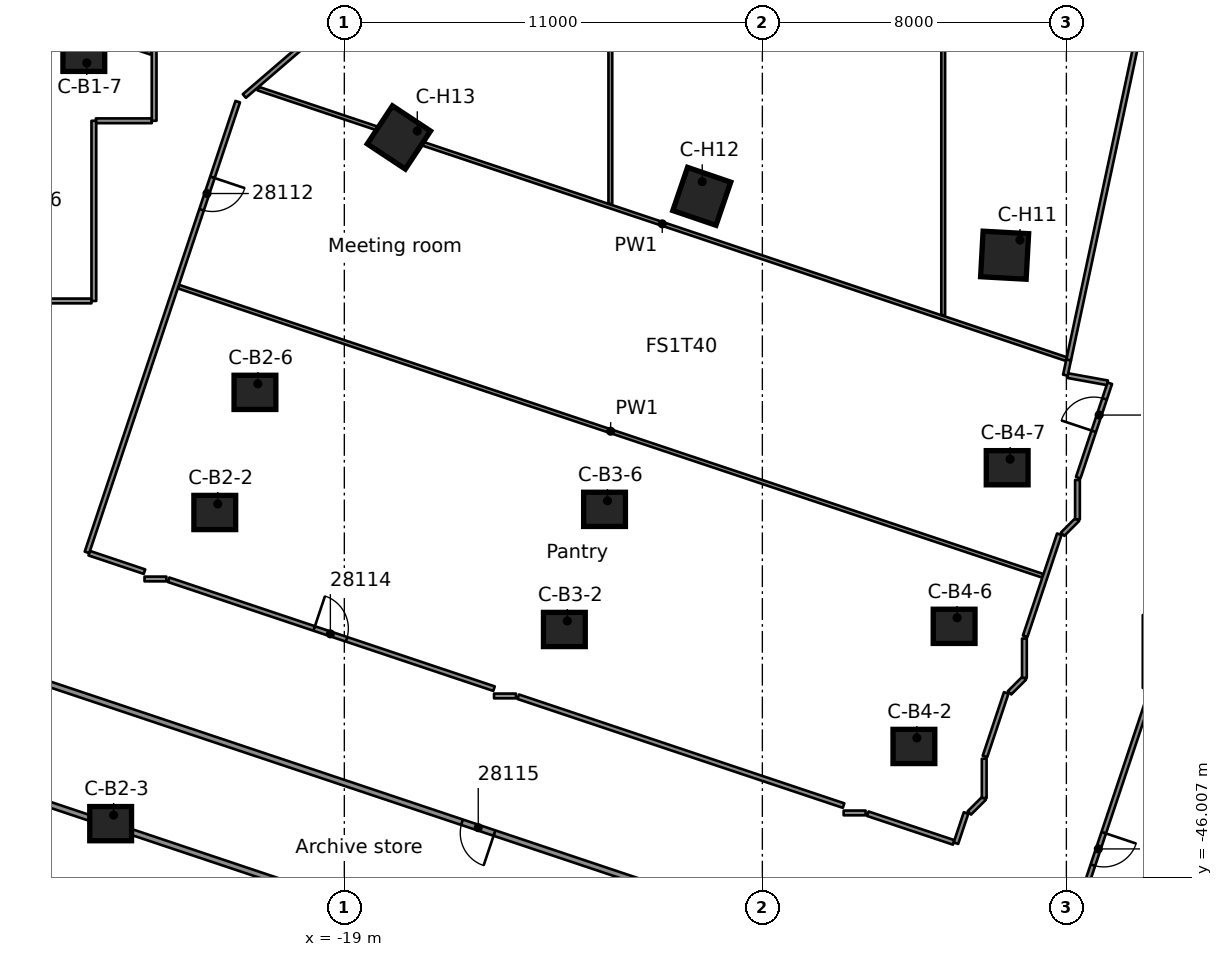
"""IFC4 building model, lengths in metres.
Left out: names, types, materials, properties, quantities, classifications, styles, units other than length and angle.
Written with IfcOpenShell. Run it as: python <this file> out.ifc"""

import sys

from ifc_helpers import new_model, si_unit, direction, frame, frame_2d, origin, origin_2d, place, context, subcontext, project, spatial, rectangle, extrude, element, fill, save


model = new_model("IFC4")
c1 = context("Model", 3, precision=1e-05, world=origin(), true_north=direction((0.0, 1.0)))
c2 = subcontext(c1, "Body", "Model", "MODEL_VIEW")
j1 = project(units=[si_unit("LENGTHUNIT", "METRE"), si_unit("PLANEANGLEUNIT", "RADIAN")], contexts=[c1])
p1 = place(None, origin())
s1 = spatial("IfcSite", under=j1, at=p1, CompositionType="ELEMENT")
p2 = place(p1, origin())
s2 = spatial("IfcBuilding", under=s1, at=p2, CompositionType="ELEMENT")
p3 = place(p2, frame((0.0, 0.0, 145.6)))
s3 = spatial("IfcBuildingStorey", under=s2, at=p3, CompositionType="ELEMENT", Elevation=145.6)
for number, where, z_axis, x_axis in (
    (1, (-25.855, -24.348, 0.0), (0.0, 0.0, 1.0), (1.0, 0.0, 0.0)),
    (2, (-22.409, -36.404, 0.0), (0.0, 0.0, 1.0), (1.0, 0.0, 0.0)),
    (3, (-25.149, -44.591, 0.0), (0.0, 0.0, 1.0), (1.0, 0.0, 0.0)),
    (4, (-21.352, -33.243, 0.0), (0.0, 0.0, 1.0), (1.0, 0.0, 0.0)),
    (5, (-13.21, -39.482, 0.0), (0.0, 0.0, 1.0), (1.0, 0.0, 0.0)),
    (6, (-12.153, -36.321, 0.0), (0.0, 0.0, 1.0), (1.0, 0.0, 0.0)),
    (7, (-4.012, -42.56, 0.0), (0.0, 0.0, 1.0), (1.0, 0.0, 0.0)),
    (8, (-2.954, -39.399, 0.0), (0.0, 0.0, 1.0), (1.0, 0.0, 0.0)),
    (9, (-1.558, -35.226, 0.0), (0.0, 0.0, 1.0), (1.0, 0.0, 0.0)),
):
    element("IfcColumn", number, at=place(p3, frame(where, z_axis=z_axis, x_axis=x_axis)), inside=s3, PredefinedType="COLUMN", context=c2, shape_type="SweptSolid", body=[
        extrude(rectangle(XDim=1.1, YDim=0.9, at=origin_2d()), origin(), (0.0, 0.0, 1.0), 3.5),
    ])
for number, where, z_axis, x_axis in (
    (10, (-1.625, -29.634, 0.0), (0.0, 0.0, 1.0), (-0.055, -0.998, 0.0)),
    (11, (-9.594, -28.085, 0.0), (0.0, 0.0, 1.0), (-0.323, -0.946, 0.0)),
    (12, (-17.564, -26.536, 0.0), (0.0, 0.0, 1.0), (-0.552, -0.834, 0.0)),
):
    element("IfcColumn", number, at=place(p3, frame(where, z_axis=z_axis, x_axis=x_axis)), inside=s3, PredefinedType="COLUMN", context=c2, shape_type="SweptSolid", body=[
        extrude(rectangle(XDim=1.2, YDim=1.2, at=origin_2d()), origin(), (0.0, 0.0, 1.0), 3.5),
    ])
p4 = place(p3, frame((-27.797, -43.741, 0.0), z_axis=(0.0, 0.0, 1.0), x_axis=(0.948342550157, -0.31724817976, 0.0)))
e13 = element("IfcWall", 13, at=p4, inside=s3, PredefinedType="PARTITIONING", context=c2, shape_type="SweptSolid", body=[
    extrude(rectangle(XDim=24.041, YDim=0.15, at=frame_2d((12.021, 0.0))), origin(), (0.0, 0.0, 1.0), 3.08),
])
p5 = place(p3, frame((-4.12, -48.496, 0.0), z_axis=(0.0, 0.0, 1.0), x_axis=(-0.948327115108, 0.31729431566, 0.0)))
e14 = element("IfcWall", 14, at=p5, inside=s3, PredefinedType="PARTITIONING", context=c2, shape_type="SweptSolid", body=[
    extrude(rectangle(XDim=23.962, YDim=0.15, at=frame_2d((11.981, 0.0))), origin(), (0.0, 0.0, 1.0), 3.08),
])
p6 = place(p5, frame((11.525, 0.0, 0.0)))
e15 = element("IfcOpeningElement", 15, at=p6, cuts=e14, PredefinedType="OPENING", context=c2, shape_type="SweptSolid", body=[
    extrude(rectangle(XDim=0.9, YDim=2.1, at=frame_2d((0.45, 1.05))), frame((0.0, 0.085, 0.0), z_axis=(0.0, -1.0, 0.0), x_axis=(1.0, 0.0, 0.0)), (0.0, 0.0, 1.0), 0.17),
])
p7 = place(p3, frame((-25.713, -37.474, 0.0), z_axis=(0.0, 0.0, 1.0), x_axis=(0.948252483091, -0.317517288209, 0.0)))
e16 = element("IfcWall", 16, at=p7, inside=s3, PredefinedType="PARTITIONING", context=c2, shape_type="SweptSolid", body=[
    extrude(rectangle(XDim=1.533, YDim=0.125, at=frame_2d((0.767, 0.0))), origin(), (0.0, 0.0, 1.0), 3.08),
])
p8 = place(p3, frame((-23.623, -38.174, 0.0), z_axis=(0.0, 0.0, 1.0), x_axis=(0.948317616384, -0.317322703971, 0.0)))
e17 = element("IfcWall", 17, at=p8, inside=s3, PredefinedType="PARTITIONING", context=c2, shape_type="SweptSolid", body=[
    extrude(rectangle(XDim=9.029, YDim=0.125, at=frame_2d((4.514, 0.0))), origin(), (0.0, 0.0, 1.0), 3.08),
])
p9 = place(p8, frame((4.038, 0.0, 0.0)))
e18 = element("IfcOpeningElement", 18, at=p9, cuts=e17, PredefinedType="OPENING", context=c2, shape_type="SweptSolid", body=[
    extrude(rectangle(XDim=0.9, YDim=2.1, at=frame_2d((0.45, 1.05))), frame((0.0, 0.073, 0.0), z_axis=(0.0, -1.0, 0.0), x_axis=(1.0, 0.0, 0.0)), (0.0, 0.0, 1.0), 0.145),
])
p10 = place(p3, frame((-14.424, -41.252, 0.0), z_axis=(0.0, 0.0, 1.0), x_axis=(0.948339274477, -0.317257971508, 0.0)))
e19 = element("IfcWall", 19, at=p10, inside=s3, PredefinedType="PARTITIONING", context=c2, shape_type="SweptSolid", body=[
    extrude(rectangle(XDim=9.027, YDim=0.125, at=frame_2d((4.514, 0.0))), origin(), (0.0, 0.0, 1.0), 3.08),
])
p11 = place(p3, frame((-5.225, -44.33, 0.0), z_axis=(0.0, 0.0, 1.0), x_axis=(0.948488440949, -0.316811738081, 0.0)))
e20 = element("IfcWall", 20, at=p11, inside=s3, PredefinedType="PARTITIONING", context=c2, shape_type="SweptSolid", body=[
    extrude(rectangle(XDim=2.383, YDim=0.125, at=frame_2d((1.191, 0.0))), origin(), (0.0, 0.0, 1.0), 3.08),
])
p12 = place(p3, frame((-23.366, -30.46, 0.0), z_axis=(0.0, 0.0, 1.0), x_axis=(0.948327494049, -0.317293183083, 0.0)))
e21 = element("IfcWall", 21, at=p12, inside=s3, PredefinedType="PARTITIONING", context=c2, shape_type="SweptSolid", body=[
    extrude(rectangle(XDim=23.988, YDim=0.1, at=frame_2d((11.994, 0.0))), origin(), (0.0, 0.0, 1.0), 3.08),
])
p13 = place(p3, frame((-28.735, -22.752, 0.0), z_axis=(0.0, 0.0, 1.0), x_axis=(0.948349317967, -0.317227948188, 0.0)))
e22 = element("IfcWall", 22, at=p13, inside=s3, PredefinedType="PARTITIONING", context=c2, shape_type="SweptSolid", body=[
    extrude(rectangle(XDim=4.906, YDim=0.1, at=frame_2d((2.453, 0.0))), origin(), (0.0, 0.0, 1.0), 3.08),
])
p14 = place(p3, frame((-21.269, -25.25, 0.0), z_axis=(0.0, 0.0, 1.0), x_axis=(0.948309286751, -0.31734759596, 0.0)))
e23 = element("IfcWall", 23, at=p14, inside=s3, PredefinedType="PARTITIONING", context=c2, shape_type="SweptSolid", body=[
    extrude(rectangle(XDim=22.429, YDim=0.1, at=frame_2d((11.215, 0.0))), origin(), (0.0, 0.0, 1.0), 3.08),
])
p15 = place(p3, frame((0.035, -32.802, 0.0), z_axis=(0.0, 0.0, 1.0), x_axis=(0.983943238731, -0.178481659998, 0.0)))
e24 = element("IfcWall", 24, at=p15, inside=s3, PredefinedType="PARTITIONING", context=c2, shape_type="SweptSolid", body=[
    extrude(rectangle(XDim=1.064, YDim=0.125, at=frame_2d((0.532, 0.0))), origin(), (0.0, 0.0, 1.0), 3.08),
])
p16 = place(p3, frame((-5.861, -44.309, 0.0), z_axis=(0.0, 0.0, 1.0), x_axis=(1.0, 0.0, 0.0)))
e25 = element("IfcWall", 25, at=p16, inside=s3, PredefinedType="PARTITIONING", context=c2, shape_type="SweptSolid", body=[
    extrude(rectangle(XDim=0.577, YDim=0.125, at=frame_2d((0.289, 0.0))), origin(), (0.0, 0.0, 1.0), 3.08),
])
p17 = place(p3, frame((-2.553, -44.309, 0.0), z_axis=(0.0, 0.0, 1.0), x_axis=(0.706885982832, 0.707327510617, 0.0)))
e26 = element("IfcWall", 26, at=p17, inside=s3, PredefinedType="PARTITIONING", context=c2, shape_type="SweptSolid", body=[
    extrude(rectangle(XDim=0.553, YDim=0.125, at=frame_2d((0.276, 0.0))), origin(), (0.0, 0.0, 1.0), 3.08),
])
p18 = place(p3, frame((-15.06, -41.231, 0.0), z_axis=(0.0, 0.0, 1.0), x_axis=(1.0, 0.0, 0.0)))
e27 = element("IfcWall", 27, at=p18, inside=s3, PredefinedType="PARTITIONING", context=c2, shape_type="SweptSolid", body=[
    extrude(rectangle(XDim=0.576, YDim=0.125, at=frame_2d((0.288, 0.0))), origin(), (0.0, 0.0, 1.0), 3.08),
])
p19 = place(p3, frame((-1.495, -41.148, 0.0), z_axis=(0.0, 0.0, 1.0), x_axis=(0.707327510617, 0.706885982832, 0.0)))
e28 = element("IfcWall", 28, at=p19, inside=s3, PredefinedType="PARTITIONING", context=c2, shape_type="SweptSolid", body=[
    extrude(rectangle(XDim=0.553, YDim=0.125, at=frame_2d((0.276, 0.0))), origin(), (0.0, 0.0, 1.0), 3.08),
])
p20 = place(p3, frame((-24.258, -38.153, 0.0), z_axis=(0.0, 0.0, 1.0), x_axis=(1.0, 0.0, 0.0)))
e29 = element("IfcWall", 29, at=p20, inside=s3, PredefinedType="PARTITIONING", context=c2, shape_type="SweptSolid", body=[
    extrude(rectangle(XDim=0.576, YDim=0.125, at=frame_2d((0.288, 0.0))), origin(), (0.0, 0.0, 1.0), 3.08),
])
p21 = place(p3, frame((-0.099, -36.975, 0.0), z_axis=(0.0, 0.0, 1.0), x_axis=(0.707106781187, 0.707106781187, 0.0)))
e30 = element("IfcWall", 30, at=p21, inside=s3, PredefinedType="PARTITIONING", context=c2, shape_type="SweptSolid", body=[
    extrude(rectangle(XDim=0.553, YDim=0.125, at=frame_2d((0.277, 0.0))), origin(), (0.0, 0.0, 1.0), 3.08),
])
p22 = place(p3, frame((-27.255, -30.838, 0.0), z_axis=(0.0, 0.0, 1.0), x_axis=(1.0, 0.0, 0.0)))
e31 = element("IfcWall", 31, at=p22, inside=s3, PredefinedType="PARTITIONING", context=c2, shape_type="SweptSolid", body=[
    extrude(rectangle(XDim=1.601, YDim=0.125, at=frame_2d((0.8, 0.0))), origin(), (0.0, 0.0, 1.0), 3.08),
])
p23 = place(p3, frame((-25.538, -26.097, 0.0), z_axis=(0.0, 0.0, 1.0), x_axis=(1.0, 0.0, 0.0)))
e32 = element("IfcWall", 32, at=p23, inside=s3, PredefinedType="PARTITIONING", context=c2, shape_type="SweptSolid", body=[
    extrude(rectangle(XDim=1.471, YDim=0.125, at=frame_2d((0.736, 0.0))), origin(), (0.0, 0.0, 1.0), 3.08),
])
p24 = place(p3, frame((-21.631, -25.445, 0.0), z_axis=(0.0, 0.0, 1.0), x_axis=(0.758076355729, 0.652165806283, 0.0)))
e33 = element("IfcWall", 33, at=p24, inside=s3, PredefinedType="PARTITIONING", context=c2, shape_type="SweptSolid", body=[
    extrude(rectangle(XDim=3.815, YDim=0.125, at=frame_2d((1.907, 0.0))), origin(), (0.0, 0.0, 1.0), 3.08),
])
p25 = place(p3, frame((2.198, -41.202, 0.0), z_axis=(0.0, 0.0, 1.0), x_axis=(-0.317452710065, -0.948274104293, 0.0)))
e34 = element("IfcWall", 34, at=p25, inside=s3, PredefinedType="PARTITIONING", context=c2, shape_type="SweptSolid", body=[
    extrude(rectangle(XDim=5.32, YDim=0.125, at=frame_2d((2.66, 0.0))), origin(), (0.0, 0.0, 1.0), 3.08),
])
p26 = place(p25, frame((3.825, 0.0, 0.0)))
e35 = element("IfcOpeningElement", 35, at=p26, cuts=e34, PredefinedType="OPENING", context=c2, shape_type="SweptSolid", body=[
    extrude(rectangle(XDim=0.9, YDim=2.1, at=frame_2d((0.45, 1.05))), frame((0.0, 0.073, 0.0), z_axis=(0.0, -1.0, 0.0), x_axis=(1.0, 0.0, 0.0)), (0.0, 0.0, 1.0), 0.145),
])
p27 = place(p3, frame((-2.906, -45.105, 0.0), z_axis=(0.0, 0.0, 1.0), x_axis=(0.317450707718, 0.948274774614, 0.0)))
e36 = element("IfcWall", 36, at=p27, inside=s3, PredefinedType="PARTITIONING", context=c2, shape_type="SweptSolid", body=[
    extrude(rectangle(XDim=0.838, YDim=0.125, at=frame_2d((0.419, 0.0))), origin(), (0.0, 0.0, 1.0), 3.08),
])
p28 = place(p3, frame((-2.142, -42.823, 0.0), z_axis=(0.0, 0.0, 1.0), x_axis=(0.316933512953, 0.948447757321, 0.0)))
e37 = element("IfcWall", 37, at=p28, inside=s3, PredefinedType="PARTITIONING", context=c2, shape_type="SweptSolid", body=[
    extrude(rectangle(XDim=1.764, YDim=0.125, at=frame_2d((0.882, 0.0))), origin(), (0.0, 0.0, 1.0), 3.08),
])
p29 = place(p3, frame((-1.084, -39.661, 0.0), z_axis=(0.0, 0.0, 1.0), x_axis=(0.317184851324, 0.948363733011, 0.0)))
e38 = element("IfcWall", 38, at=p29, inside=s3, PredefinedType="PARTITIONING", context=c2, shape_type="SweptSolid", body=[
    extrude(rectangle(XDim=2.831, YDim=0.125, at=frame_2d((1.416, 0.0))), origin(), (0.0, 0.0, 1.0), 3.08),
])
p30 = place(p3, frame((0.312, -35.488, 0.0), z_axis=(0.0, 0.0, 1.0), x_axis=(0.317149997564, 0.948375389308, 0.0)))
e39 = element("IfcWall", 39, at=p30, inside=s3, PredefinedType="PARTITIONING", context=c2, shape_type="SweptSolid", body=[
    extrude(rectangle(XDim=2.62, YDim=0.125, at=frame_2d((1.31, 0.0))), origin(), (0.0, 0.0, 1.0), 3.08),
])
p31 = place(p30, frame((1.288, 0.0, 0.0)))
e40 = element("IfcOpeningElement", 40, at=p31, cuts=e39, PredefinedType="OPENING", context=c2, shape_type="SweptSolid", body=[
    extrude(rectangle(XDim=0.9, YDim=2.1, at=frame_2d((0.45, 1.05))), frame((0.0, 0.073, 0.0), z_axis=(0.0, -1.0, 0.0), x_axis=(1.0, 0.0, 0.0)), (0.0, 0.0, 1.0), 0.145),
])
p32 = place(p3, frame((-21.805, -25.594, 0.0), z_axis=(0.0, 0.0, 1.0), x_axis=(-0.317211500161, -0.948354819762, 0.0)))
e41 = element("IfcWall", 41, at=p32, inside=s3, PredefinedType="PARTITIONING", context=c2, shape_type="SweptSolid", body=[
    extrude(rectangle(XDim=12.506, YDim=0.125, at=frame_2d((6.253, 0.0))), origin(), (0.0, 0.0, 1.0), 3.08),
])
p33 = place(p32, frame((2.098, 0.0, 0.0)))
e42 = element("IfcOpeningElement", 42, at=p33, cuts=e41, PredefinedType="OPENING", context=c2, shape_type="SweptSolid", body=[
    extrude(rectangle(XDim=0.9, YDim=2.1, at=frame_2d((0.45, 1.05))), frame((0.0, 0.073, 0.0), z_axis=(0.0, -1.0, 0.0), x_axis=(1.0, 0.0, 0.0)), (0.0, 0.0, 1.0), 0.145),
])
p34 = place(p3, frame((-0.026, -32.791, 0.0), z_axis=(0.0, 0.0, 1.0), x_axis=(0.210295516646, 0.977637865305, 0.0)))
e43 = element("IfcWall", 43, at=p34, inside=s3, PredefinedType="PARTITIONING", context=c2, shape_type="SweptSolid", body=[
    extrude(rectangle(XDim=0.413, YDim=0.125, at=frame_2d((0.207, 0.0))), origin(), (0.0, 0.0, 1.0), 3.08),
])
p35 = place(p3, frame((0.061, -32.387, 0.0), z_axis=(0.0, 0.0, 1.0), x_axis=(0.209029624493, 0.977909308721, 0.0)))
e44 = element("IfcWall", 44, at=p35, inside=s3, PredefinedType="PARTITIONING", context=c2, shape_type="SweptSolid", body=[
    extrude(rectangle(XDim=18.394, YDim=0.125, at=frame_2d((9.197, 0.0))), origin(), (0.0, 0.0, 1.0), 3.08),
])
p36 = place(p35, frame((8.624, 0.0, 0.0)))
e45 = element("IfcOpeningElement", 45, at=p36, cuts=e44, PredefinedType="OPENING", context=c2, shape_type="SweptSolid", body=[
    extrude(rectangle(XDim=1.1, YDim=2.1, at=frame_2d((0.55, 1.05))), frame((0.0, 0.073, 0.0), z_axis=(0.0, -1.0, 0.0), x_axis=(1.0, 0.0, 0.0)), (0.0, 0.0, 1.0), 0.145),
])
p37 = place(p35, frame((16.404, 0.0, 0.0)))
e46 = element("IfcOpeningElement", 46, at=p37, cuts=e44, PredefinedType="OPENING", context=c2, shape_type="SweptSolid", body=[
    extrude(rectangle(XDim=1.1, YDim=2.1, at=frame_2d((0.55, 1.05))), frame((0.0, 0.073, 0.0), z_axis=(0.0, -1.0, 0.0), x_axis=(1.0, 0.0, 0.0)), (0.0, 0.0, 1.0), 0.145),
])
p38 = place(p3, frame((2.073, -41.02, 0.0), z_axis=(0.0, 0.0, 1.0), x_axis=(0.0, 1.0, 0.0)))
e47 = element("IfcWall", 47, at=p38, inside=s3, PredefinedType="PARTITIONING", context=c2, shape_type="SweptSolid", body=[
    extrude(rectangle(XDim=1.919, YDim=0.125, at=frame_2d((0.959, 0.0))), origin(), (0.0, 0.0, 1.0), 3.08),
])
p39 = place(p3, frame((0.292, -36.584, 0.0), z_axis=(0.0, 0.0, 1.0), x_axis=(0.0, 1.0, 0.0)))
e48 = element("IfcWall", 48, at=p39, inside=s3, PredefinedType="PARTITIONING", context=c2, shape_type="SweptSolid", body=[
    extrude(rectangle(XDim=1.037, YDim=0.125, at=frame_2d((0.519, 0.0))), origin(), (0.0, 0.0, 1.0), 3.08),
])
p40 = place(p3, frame((-1.104, -40.757, 0.0), z_axis=(0.0, 0.0, 1.0), x_axis=(0.0, 1.0, 0.0)))
e49 = element("IfcWall", 49, at=p40, inside=s3, PredefinedType="PARTITIONING", context=c2, shape_type="SweptSolid", body=[
    extrude(rectangle(XDim=1.037, YDim=0.125, at=frame_2d((0.519, 0.0))), origin(), (0.0, 0.0, 1.0), 3.08),
])
p41 = place(p3, frame((-2.162, -43.918, 0.0), z_axis=(0.0, 0.0, 1.0), x_axis=(0.0, 1.0, 0.0)))
e50 = element("IfcWall", 50, at=p41, inside=s3, PredefinedType="PARTITIONING", context=c2, shape_type="SweptSolid", body=[
    extrude(rectangle(XDim=1.036, YDim=0.125, at=frame_2d((0.518, 0.0))), origin(), (0.0, 0.0, 1.0), 3.08),
])
p42 = place(p3, frame((-3.241, -31.213, 0.0), z_axis=(0.0, 0.0, 1.0), x_axis=(0.0, 1.0, 0.0)))
e51 = element("IfcWall", 51, at=p42, inside=s3, PredefinedType="PARTITIONING", context=c2, shape_type="SweptSolid", body=[
    extrude(rectangle(XDim=16.75, YDim=0.1, at=frame_2d((8.375, 0.0))), origin(), (0.0, 0.0, 1.0), 3.08),
])
p43 = place(p3, frame((-12.0, -28.282, 0.0), z_axis=(0.0, 0.0, 1.0), x_axis=(0.0, 1.0, 0.0)))
e52 = element("IfcWall", 52, at=p43, inside=s3, PredefinedType="PARTITIONING", context=c2, shape_type="SweptSolid", body=[
    extrude(rectangle(XDim=13.768, YDim=0.1, at=frame_2d((6.884, 0.0))), origin(), (0.0, 0.0, 1.0), 3.08),
])
p44 = place(p3, frame((-24.005, -26.097, 0.0), z_axis=(0.0, 0.0, 1.0), x_axis=(0.0, 1.0, 0.0)))
e53 = element("IfcWall", 53, at=p44, inside=s3, PredefinedType="PARTITIONING", context=c2, shape_type="SweptSolid", body=[
    extrude(rectangle(XDim=3.36, YDim=0.125, at=frame_2d((1.68, 0.0))), origin(), (0.0, 0.0, 1.0), 3.08),
])
p45 = place(p3, frame((-25.591, -30.838, 0.0), z_axis=(0.0, 0.0, 1.0), x_axis=(0.0, 1.0, 0.0)))
e54 = element("IfcWall", 54, at=p45, inside=s3, PredefinedType="PARTITIONING", context=c2, shape_type="SweptSolid", body=[
    extrude(rectangle(XDim=4.741, YDim=0.125, at=frame_2d((2.371, 0.0))), origin(), (0.0, 0.0, 1.0), 3.08),
])
p46 = place(p26, origin())
e55 = element("IfcDoor", 55, at=p46, inside=s3, OperationType="SINGLE_SWING_RIGHT", PredefinedType="DOOR", context=c2, shape_type="SweptSolid", body=[
    extrude(rectangle(XDim=0.9, YDim=2.1, at=frame_2d((0.45, 1.05))), frame((0.0, 0.025, 0.0), z_axis=(0.0, -1.0, 0.0), x_axis=(1.0, 0.0, 0.0)), (0.0, 0.0, 1.0), 0.05),
])
fill(e35, e55)
p47 = place(p33, origin())
e56 = element("IfcDoor", 56, at=p47, inside=s3, OperationType="SINGLE_SWING_LEFT", PredefinedType="DOOR", context=c2, shape_type="SweptSolid", body=[
    extrude(rectangle(XDim=0.9, YDim=2.1, at=frame_2d((0.45, 1.05))), frame((0.0, 0.025, 0.0), z_axis=(0.0, -1.0, 0.0), x_axis=(1.0, 0.0, 0.0)), (0.0, 0.0, 1.0), 0.05),
])
fill(e42, e56)
p48 = place(p31, origin())
e57 = element("IfcDoor", 57, at=p48, inside=s3, OperationType="SINGLE_SWING_RIGHT", PredefinedType="DOOR", context=c2, shape_type="SweptSolid", body=[
    extrude(rectangle(XDim=0.9, YDim=2.1, at=frame_2d((0.45, 1.05))), frame((0.0, 0.025, 0.0), z_axis=(0.0, -1.0, 0.0), x_axis=(1.0, 0.0, 0.0)), (0.0, 0.0, 1.0), 0.05),
])
fill(e40, e57)
p49 = place(p9, origin())
e58 = element("IfcDoor", 58, at=p49, inside=s3, OperationType="SINGLE_SWING_LEFT", PredefinedType="DOOR", context=c2, shape_type="SweptSolid", body=[
    extrude(rectangle(XDim=0.9, YDim=2.1, at=frame_2d((0.45, 1.05))), frame((0.0, 0.025, 0.0), z_axis=(0.0, -1.0, 0.0), x_axis=(1.0, 0.0, 0.0)), (0.0, 0.0, 1.0), 0.05),
])
fill(e18, e58)
p50 = place(p6, origin())
e59 = element("IfcDoor", 59, at=p50, inside=s3, OperationType="SINGLE_SWING_LEFT", PredefinedType="DOOR", context=c2, shape_type="SweptSolid", body=[
    extrude(rectangle(XDim=0.9, YDim=2.1, at=frame_2d((0.45, 1.05))), frame((0.0, 0.025, 0.0), z_axis=(0.0, -1.0, 0.0), x_axis=(1.0, 0.0, 0.0)), (0.0, 0.0, 1.0), 0.05),
])
fill(e15, e59)
save(model, sys.argv[1])
